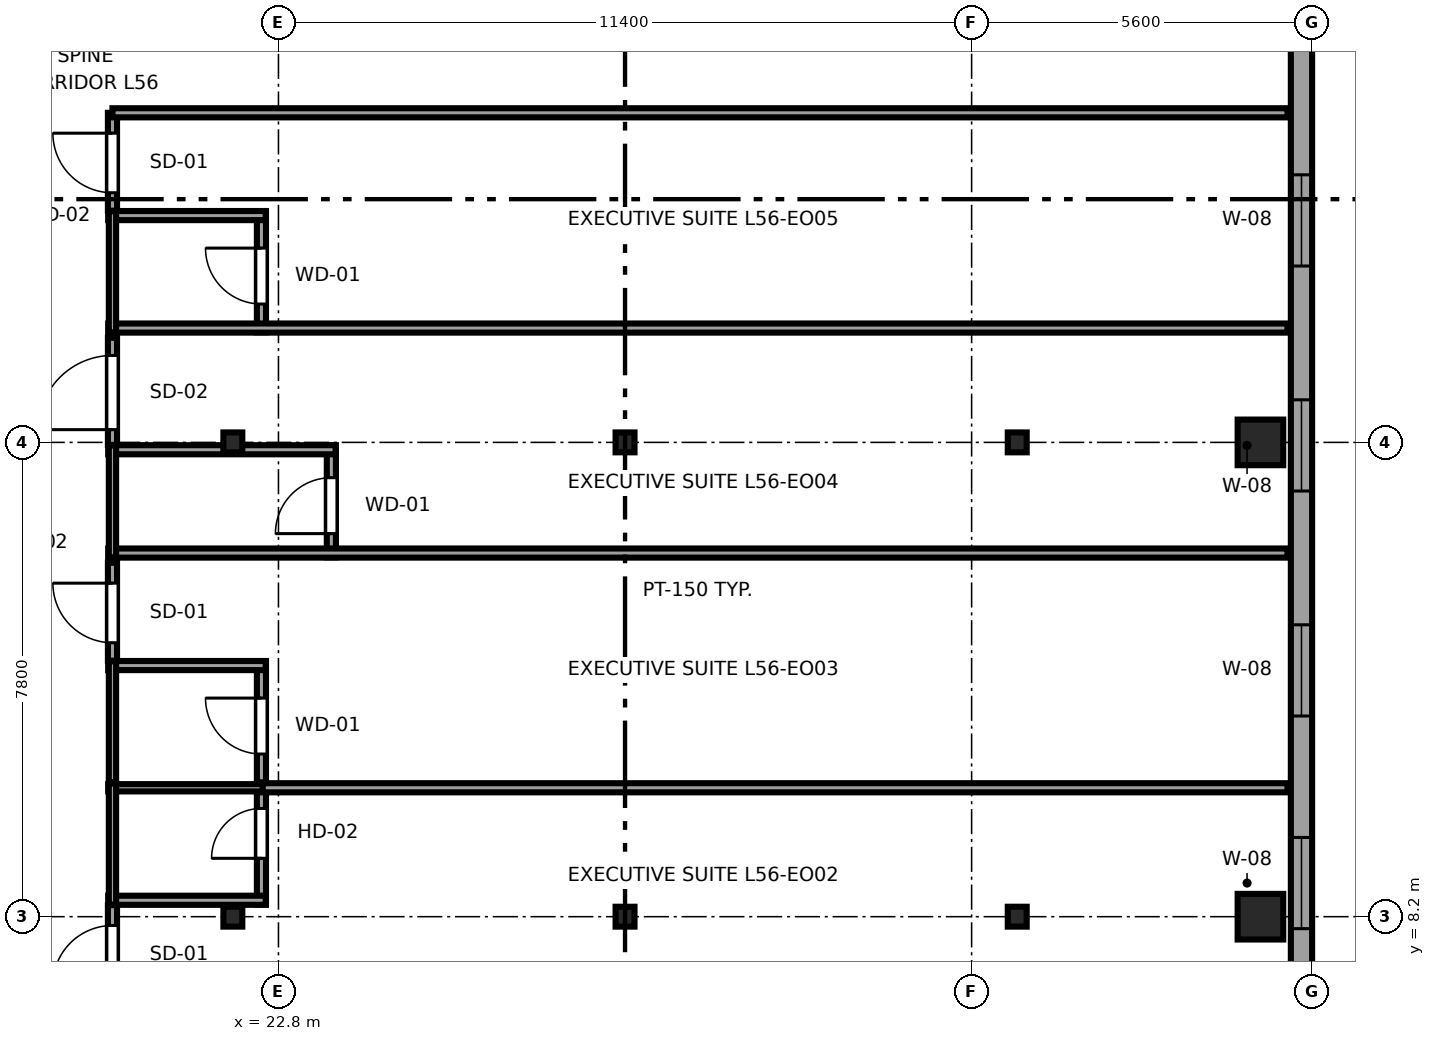
"""IFC4 building model, lengths in metres.
Left out: names, types, materials, properties, quantities, classifications, styles, units other than length and angle.
Written with IfcOpenShell. Run it as: python <this file> out.ifc"""

import sys

from ifc_helpers import new_model, si_unit, direction, frame, frame_2d, origin, origin_2d, place, context, subcontext, project, spatial, rectangle, i_section, extrude, source, transform, mapped, element, fill, save


model = new_model("IFC4")
c1 = context("Model", 3, precision=1e-05, world=origin(), true_north=direction((0.0, 1.0)))
c2 = subcontext(c1, "Body", "Model", "MODEL_VIEW")
j1 = project(units=[si_unit("LENGTHUNIT", "METRE"), si_unit("PLANEANGLEUNIT", "RADIAN")], contexts=[c1])
p1 = place(None, origin())
s1 = spatial("IfcSite", under=j1, at=p1, CompositionType="ELEMENT")
p2 = place(p1, origin())
s2 = spatial("IfcBuilding", under=s1, at=p2, CompositionType="ELEMENT")
p3 = place(p2, frame((0.0, 0.0, 213.25)))
s3 = spatial("IfcBuildingStorey", under=s2, at=p3, CompositionType="ELEMENT", Elevation=213.25)
m1 = source(origin(), c2, "Body", "SweptSolid", [
    extrude(i_section(OverallWidth=0.311, OverallDepth=0.327, WebThickness=0.016, FlangeThickness=0.025, FilletRadius=0.017, at=origin_2d()), origin(), (0.0, 0.0, 1.0), 3.55),
])
for number, where, z_axis, x_axis in (
    (1, (22.05, 8.2, 0.0), (0.0, 0.0, 1.0), (1.0, 0.0, 0.0)),
    (2, (22.05, 16.0, 0.0), (0.0, 0.0, 1.0), (1.0, 0.0, 0.0)),
    (3, (28.5, 8.2, 0.0), (0.0, 0.0, 1.0), (1.0, 0.0, 0.0)),
    (4, (28.5, 16.0, 0.0), (0.0, 0.0, 1.0), (1.0, 0.0, 0.0)),
    (5, (34.95, 8.2, 0.0), (0.0, 0.0, 1.0), (1.0, 0.0, 0.0)),
    (6, (34.95, 16.0, 0.0), (0.0, 0.0, 1.0), (1.0, 0.0, 0.0)),
):
    element("IfcColumn", number, at=place(p3, frame(where, z_axis=z_axis, x_axis=x_axis)), inside=s3, PredefinedType="COLUMN", context=c2, shape_type="MappedRepresentation", body=[
        mapped(m1, transform((0.0, 0.0, 0.0), x_axis=(1.0, 0.0, 0.0), y_axis=(0.0, 1.0, 0.0), z_axis=(0.0, 0.0, 1.0), scale=1.0)),
    ])
m2 = source(origin(), c2, "Body", "SweptSolid", [
    extrude(rectangle(XDim=0.75, YDim=0.75, at=origin_2d()), origin(), (0.0, 0.0, 1.0), 3.55),
])
for number, where, z_axis, x_axis in (
    (7, (38.95, 8.2, 0.0), (0.0, 0.0, 1.0), (1.0, 0.0, 0.0)),
    (8, (38.95, 16.0, 0.0), (0.0, 0.0, 1.0), (1.0, 0.0, 0.0)),
):
    element("IfcColumn", number, at=place(p3, frame(where, z_axis=z_axis, x_axis=x_axis)), inside=s3, PredefinedType="COLUMN", context=c2, shape_type="MappedRepresentation", body=[
        mapped(m2, transform((0.0, 0.0, 0.0), x_axis=(1.0, 0.0, 0.0), y_axis=(0.0, 1.0, 0.0), z_axis=(0.0, 0.0, 1.0), scale=1.0)),
    ])
p4 = place(p3, frame((39.625, 7.017, 0.0), z_axis=(0.0, 0.0, 1.0), x_axis=(0.0, 1.0, 0.0)))
e9 = element("IfcWall", 9, at=p4, inside=s3, PredefinedType="SOLIDWALL", context=c2, shape_type="SweptSolid", body=[
    extrude(rectangle(XDim=24.579, YDim=0.35, at=frame_2d((12.29, 0.0))), origin(), (0.0, 0.0, 1.0), 3.37),
])
p5 = place(p4, frame((20.291, 0.0, 0.68)))
e10 = element("IfcOpeningElement", 10, at=p5, cuts=e9, PredefinedType="OPENING", context=c2, shape_type="SweptSolid", body=[
    extrude(rectangle(XDim=2.7, YDim=1.95, at=frame_2d((1.35, 0.975))), frame((0.0, 0.185, 0.0), z_axis=(0.0, -1.0, 0.0), x_axis=(1.0, 0.0, 0.0)), (0.0, 0.0, 1.0), 0.37),
])
p6 = place(p4, frame((0.986, 0.0, 0.62)))
e11 = element("IfcOpeningElement", 11, at=p6, cuts=e9, PredefinedType="OPENING", context=c2, shape_type="SweptSolid", body=[
    extrude(rectangle(XDim=1.5, YDim=1.55, at=frame_2d((0.75, 0.775))), frame((0.0, 0.185, 0.0), z_axis=(0.0, -1.0, 0.0), x_axis=(1.0, 0.0, 0.0)), (0.0, 0.0, 1.0), 0.37),
])
p7 = place(p4, frame((4.483, 0.0, 0.62)))
e12 = element("IfcOpeningElement", 12, at=p7, cuts=e9, PredefinedType="OPENING", context=c2, shape_type="SweptSolid", body=[
    extrude(rectangle(XDim=1.5, YDim=1.55, at=frame_2d((0.75, 0.775))), frame((0.0, 0.185, 0.0), z_axis=(0.0, -1.0, 0.0), x_axis=(1.0, 0.0, 0.0)), (0.0, 0.0, 1.0), 0.37),
])
p8 = place(p4, frame((8.183, 0.0, 0.62)))
e13 = element("IfcOpeningElement", 13, at=p8, cuts=e9, PredefinedType="OPENING", context=c2, shape_type="SweptSolid", body=[
    extrude(rectangle(XDim=1.5, YDim=1.55, at=frame_2d((0.75, 0.775))), frame((0.0, 0.185, 0.0), z_axis=(0.0, -1.0, 0.0), x_axis=(1.0, 0.0, 0.0)), (0.0, 0.0, 1.0), 0.37),
])
p9 = place(p4, frame((11.883, 0.0, 0.62)))
e14 = element("IfcOpeningElement", 14, at=p9, cuts=e9, PredefinedType="OPENING", context=c2, shape_type="SweptSolid", body=[
    extrude(rectangle(XDim=1.5, YDim=1.55, at=frame_2d((0.75, 0.775))), frame((0.0, 0.185, 0.0), z_axis=(0.0, -1.0, 0.0), x_axis=(1.0, 0.0, 0.0)), (0.0, 0.0, 1.0), 0.37),
])
p10 = place(p3, frame((22.52, 8.4, 0.0), z_axis=(0.0, 0.0, 1.0), x_axis=(0.0, 1.0, 0.0)))
e15 = element("IfcWall", 15, at=p10, inside=s3, PredefinedType="PARTITIONING", context=c2, shape_type="SweptSolid", body=[
    extrude(rectangle(XDim=1.99, YDim=0.15, at=frame_2d((0.995, 0.0))), origin(), (0.0, 0.0, 1.0), 3.37),
])
p11 = place(p10, frame((0.76, 0.0, 0.0)))
e16 = element("IfcOpeningElement", 16, at=p11, cuts=e15, PredefinedType="OPENING", context=c2, shape_type="SweptSolid", body=[
    extrude(rectangle(XDim=0.82, YDim=2.01, at=frame_2d((0.41, 1.005))), frame((0.0, 0.085, 0.0), z_axis=(0.0, -1.0, 0.0), x_axis=(1.0, 0.0, 0.0)), (0.0, 0.0, 1.0), 0.17),
])
p12 = place(p3, frame((20.0, 8.47, 0.0), z_axis=(0.0, 0.0, 1.0), x_axis=(1.0, 0.0, 0.0)))
e17 = element("IfcWall", 17, at=p12, inside=s3, PredefinedType="PARTITIONING", context=c2, shape_type="SweptSolid", body=[
    extrude(rectangle(XDim=2.59, YDim=0.15, at=frame_2d((1.295, 0.0))), origin(), (0.0, 0.0, 1.0), 3.37),
])
p13 = place(p3, frame((20.0, 10.32, 0.0), z_axis=(0.0, 0.0, 1.0), x_axis=(1.0, 0.0, 0.0)))
e18 = element("IfcWall", 18, at=p13, inside=s3, PredefinedType="PLUMBINGWALL", context=c2, shape_type="SweptSolid", body=[
    extrude(rectangle(XDim=2.59, YDim=0.12, at=frame_2d((1.295, 0.0))), origin(), (0.0, 0.0, 1.0), 3.37),
])
p14 = place(p3, frame((20.07, 8.4, 0.0), z_axis=(0.0, 0.0, 1.0), x_axis=(0.0, 1.0, 0.0)))
e19 = element("IfcWall", 19, at=p14, inside=s3, PredefinedType="PLUMBINGWALL", context=c2, shape_type="SweptSolid", body=[
    extrude(rectangle(XDim=1.99, YDim=0.12, at=frame_2d((0.995, 0.0))), origin(), (0.0, 0.0, 1.0), 3.37),
])
p15 = place(p3, frame((22.52, 10.41, 0.0), z_axis=(0.0, 0.0, 1.0), x_axis=(0.0, 1.0, 0.0)))
e20 = element("IfcWall", 20, at=p15, inside=s3, PredefinedType="PARTITIONING", context=c2, shape_type="SweptSolid", body=[
    extrude(rectangle(XDim=1.99, YDim=0.15, at=frame_2d((0.995, 0.0))), origin(), (0.0, 0.0, 1.0), 3.37),
])
p16 = place(p15, frame((0.465, 0.0, 0.0)))
e21 = element("IfcOpeningElement", 21, at=p16, cuts=e20, PredefinedType="OPENING", context=c2, shape_type="SweptSolid", body=[
    extrude(rectangle(XDim=0.92, YDim=2.01, at=frame_2d((0.46, 1.005))), frame((0.0, 0.085, 0.0), z_axis=(0.0, -1.0, 0.0), x_axis=(1.0, 0.0, 0.0)), (0.0, 0.0, 1.0), 0.17),
])
p17 = place(p3, frame((20.0, 12.33, 0.0), z_axis=(0.0, 0.0, 1.0), x_axis=(1.0, 0.0, 0.0)))
e22 = element("IfcWall", 22, at=p17, inside=s3, PredefinedType="PARTITIONING", context=c2, shape_type="SweptSolid", body=[
    extrude(rectangle(XDim=2.59, YDim=0.15, at=frame_2d((1.295, 0.0))), origin(), (0.0, 0.0, 1.0), 3.37),
])
p18 = place(p3, frame((20.07, 10.41, 0.0), z_axis=(0.0, 0.0, 1.0), x_axis=(0.0, 1.0, 0.0)))
e23 = element("IfcWall", 23, at=p18, inside=s3, PredefinedType="PLUMBINGWALL", context=c2, shape_type="SweptSolid", body=[
    extrude(rectangle(XDim=1.99, YDim=0.12, at=frame_2d((0.995, 0.0))), origin(), (0.0, 0.0, 1.0), 3.37),
])
p19 = place(p3, frame((23.67, 14.11, 0.0), z_axis=(0.0, 0.0, 1.0), x_axis=(0.0, 1.0, 0.0)))
e24 = element("IfcWall", 24, at=p19, inside=s3, PredefinedType="PARTITIONING", context=c2, shape_type="SweptSolid", body=[
    extrude(rectangle(XDim=1.839, YDim=0.15, at=frame_2d((0.919, 0.0))), origin(), (0.0, 0.0, 1.0), 3.37),
])
p20 = place(p19, frame((0.389, 0.0, 0.0)))
e25 = element("IfcOpeningElement", 25, at=p20, cuts=e24, PredefinedType="OPENING", context=c2, shape_type="SweptSolid", body=[
    extrude(rectangle(XDim=0.92, YDim=2.01, at=frame_2d((0.46, 1.005))), frame((0.0, 0.085, 0.0), z_axis=(0.0, -1.0, 0.0), x_axis=(1.0, 0.0, 0.0)), (0.0, 0.0, 1.0), 0.17),
])
p21 = place(p3, frame((20.0, 14.18, 0.0), z_axis=(0.0, 0.0, 1.0), x_axis=(1.0, 0.0, 0.0)))
e26 = element("IfcWall", 26, at=p21, inside=s3, PredefinedType="PARTITIONING", context=c2, shape_type="SweptSolid", body=[
    extrude(rectangle(XDim=19.395, YDim=0.15, at=frame_2d((9.698, 0.0))), origin(), (0.0, 0.0, 1.0), 3.37),
])
p22 = place(p3, frame((20.0, 15.879, 0.0), z_axis=(0.0, 0.0, 1.0), x_axis=(1.0, 0.0, 0.0)))
e27 = element("IfcWall", 27, at=p22, inside=s3, PredefinedType="PARTITIONING", context=c2, shape_type="SweptSolid", body=[
    extrude(rectangle(XDim=3.74, YDim=0.15, at=frame_2d((1.87, 0.0))), origin(), (0.0, 0.0, 1.0), 2.758),
])
p23 = place(p3, frame((20.07, 14.11, 0.0), z_axis=(0.0, 0.0, 1.0), x_axis=(0.0, 1.0, 0.0)))
e28 = element("IfcWall", 28, at=p23, inside=s3, PredefinedType="PLUMBINGWALL", context=c2, shape_type="SweptSolid", body=[
    extrude(rectangle(XDim=1.839, YDim=0.12, at=frame_2d((0.919, 0.0))), origin(), (0.0, 0.0, 1.0), 3.37),
])
p24 = place(p3, frame((22.52, 17.81, 0.0), z_axis=(0.0, 0.0, 1.0), x_axis=(0.0, 1.0, 0.0)))
e29 = element("IfcWall", 29, at=p24, inside=s3, PredefinedType="PARTITIONING", context=c2, shape_type="SweptSolid", body=[
    extrude(rectangle(XDim=1.99, YDim=0.15, at=frame_2d((0.995, 0.0))), origin(), (0.0, 0.0, 1.0), 3.37),
])
p25 = place(p24, frame((0.465, 0.0, 0.0)))
e30 = element("IfcOpeningElement", 30, at=p25, cuts=e29, PredefinedType="OPENING", context=c2, shape_type="SweptSolid", body=[
    extrude(rectangle(XDim=0.92, YDim=2.01, at=frame_2d((0.46, 1.005))), frame((0.0, 0.085, 0.0), z_axis=(0.0, -1.0, 0.0), x_axis=(1.0, 0.0, 0.0)), (0.0, 0.0, 1.0), 0.17),
])
p26 = place(p3, frame((20.0, 17.88, 0.0), z_axis=(0.0, 0.0, 1.0), x_axis=(1.0, 0.0, 0.0)))
e31 = element("IfcWall", 31, at=p26, inside=s3, PredefinedType="PARTITIONING", context=c2, shape_type="SweptSolid", body=[
    extrude(rectangle(XDim=19.395, YDim=0.15, at=frame_2d((9.698, 0.0))), origin(), (0.0, 0.0, 1.0), 3.37),
])
p27 = place(p3, frame((20.0, 19.73, 0.0), z_axis=(0.0, 0.0, 1.0), x_axis=(1.0, 0.0, 0.0)))
e32 = element("IfcWall", 32, at=p27, inside=s3, PredefinedType="PARTITIONING", context=c2, shape_type="SweptSolid", body=[
    extrude(rectangle(XDim=2.59, YDim=0.15, at=frame_2d((1.295, 0.0))), origin(), (0.0, 0.0, 1.0), 3.37),
])
p28 = place(p3, frame((20.07, 17.81, 0.0), z_axis=(0.0, 0.0, 1.0), x_axis=(0.0, 1.0, 0.0)))
e33 = element("IfcWall", 33, at=p28, inside=s3, PredefinedType="PLUMBINGWALL", context=c2, shape_type="SweptSolid", body=[
    extrude(rectangle(XDim=1.99, YDim=0.12, at=frame_2d((0.995, 0.0))), origin(), (0.0, 0.0, 1.0), 3.37),
])
p29 = place(p3, frame((20.07, 6.78, 0.0), z_axis=(0.0, 0.0, 1.0), x_axis=(0.0, 1.0, 0.0)))
e34 = element("IfcWall", 34, at=p29, inside=s3, PredefinedType="PARTITIONING", context=c2, shape_type="SweptSolid", body=[
    extrude(rectangle(XDim=1.61, YDim=0.15, at=frame_2d((0.805, 0.0))), origin(), (0.0, 0.0, 1.0), 3.37),
])
p30 = place(p29, frame((0.295, 0.0, 0.0)))
e35 = element("IfcOpeningElement", 35, at=p30, cuts=e34, PredefinedType="OPENING", context=c2, shape_type="SweptSolid", body=[
    extrude(rectangle(XDim=0.98, YDim=2.12, at=frame_2d((0.49, 1.06))), frame((0.0, 0.085, 0.0), z_axis=(0.0, -1.0, 0.0), x_axis=(1.0, 0.0, 0.0)), (0.0, 0.0, 1.0), 0.17),
])
p31 = place(p3, frame((22.54, 10.32, 0.0), z_axis=(0.0, 0.0, 1.0), x_axis=(1.0, 0.0, 0.0)))
e36 = element("IfcWall", 36, at=p31, inside=s3, PredefinedType="PARTITIONING", context=c2, shape_type="SweptSolid", body=[
    extrude(rectangle(XDim=16.855, YDim=0.15, at=frame_2d((8.427, 0.0))), origin(), (0.0, 0.0, 1.0), 3.37),
])
p32 = place(p3, frame((20.07, 12.41, 0.0), z_axis=(0.0, 0.0, 1.0), x_axis=(0.0, 1.0, 0.0)))
e37 = element("IfcWall", 37, at=p32, inside=s3, PredefinedType="PARTITIONING", context=c2, shape_type="SweptSolid", body=[
    extrude(rectangle(XDim=1.61, YDim=0.15, at=frame_2d((0.805, 0.0))), origin(), (0.0, 0.0, 1.0), 3.37),
])
p33 = place(p32, frame((0.295, 0.0, 0.0)))
e38 = element("IfcOpeningElement", 38, at=p33, cuts=e37, PredefinedType="OPENING", context=c2, shape_type="SweptSolid", body=[
    extrude(rectangle(XDim=0.98, YDim=2.12, at=frame_2d((0.49, 1.06))), frame((0.0, 0.085, 0.0), z_axis=(0.0, -1.0, 0.0), x_axis=(1.0, 0.0, 0.0)), (0.0, 0.0, 1.0), 0.17),
])
p34 = place(p3, frame((20.07, 15.959, 0.0), z_axis=(0.0, 0.0, 1.0), x_axis=(0.0, 1.0, 0.0)))
e39 = element("IfcWall", 39, at=p34, inside=s3, PredefinedType="PARTITIONING", context=c2, shape_type="SweptSolid", body=[
    extrude(rectangle(XDim=1.761, YDim=0.15, at=frame_2d((0.88, 0.0))), origin(), (0.0, 0.0, 1.0), 3.37),
])
p35 = place(p34, frame((0.25, 0.0, 0.0)))
e40 = element("IfcOpeningElement", 40, at=p35, cuts=e39, PredefinedType="OPENING", context=c2, shape_type="SweptSolid", body=[
    extrude(rectangle(XDim=1.22, YDim=2.08, at=frame_2d((0.61, 1.04))), frame((0.0, 0.085, 0.0), z_axis=(0.0, -1.0, 0.0), x_axis=(1.0, 0.0, 0.0)), (0.0, 0.0, 1.0), 0.17),
])
p36 = place(p3, frame((20.07, 19.81, 0.0), z_axis=(0.0, 0.0, 1.0), x_axis=(0.0, 1.0, 0.0)))
e41 = element("IfcWall", 41, at=p36, inside=s3, PredefinedType="PARTITIONING", context=c2, shape_type="SweptSolid", body=[
    extrude(rectangle(XDim=1.61, YDim=0.15, at=frame_2d((0.805, 0.0))), origin(), (0.0, 0.0, 1.0), 3.37),
])
p37 = place(p36, frame((0.295, 0.0, 0.0)))
e42 = element("IfcOpeningElement", 42, at=p37, cuts=e41, PredefinedType="OPENING", context=c2, shape_type="SweptSolid", body=[
    extrude(rectangle(XDim=0.98, YDim=2.12, at=frame_2d((0.49, 1.06))), frame((0.0, 0.085, 0.0), z_axis=(0.0, -1.0, 0.0), x_axis=(1.0, 0.0, 0.0)), (0.0, 0.0, 1.0), 0.17),
])
p38 = place(p3, frame((20.07, 21.42, 0.0), z_axis=(0.0, 0.0, 1.0), x_axis=(1.0, 0.0, 0.0)))
e43 = element("IfcWall", 43, at=p38, inside=s3, PredefinedType="PARTITIONING", context=c2, shape_type="SweptSolid", body=[
    extrude(rectangle(XDim=19.325, YDim=0.15, at=frame_2d((9.663, 0.0))), origin(), (0.0, 0.0, 1.0), 3.37),
])
m3 = source(origin(), c2, "Body", "SweptSolid", [
    extrude(rectangle(XDim=1.5, YDim=1.55, at=frame_2d((0.75, 0.775))), frame((0.0, 0.09, 0.0), z_axis=(0.0, -1.0, 0.0), x_axis=(1.0, 0.0, 0.0)), (0.0, 0.0, 1.0), 0.06),
])
p39 = place(p6, origin())
e44 = element("IfcWindow", 44, at=p39, inside=s3, PartitioningType="SINGLE_PANEL", PredefinedType="WINDOW", context=c2, shape_type="MappedRepresentation", body=[
    mapped(m3, transform((0.0, 0.0, 0.0), x_axis=(1.0, 0.0, 0.0), y_axis=(0.0, 1.0, 0.0), z_axis=(0.0, 0.0, 1.0), scale=1.0)),
])
fill(e11, e44)
p40 = place(p7, origin())
e45 = element("IfcWindow", 45, at=p40, inside=s3, PartitioningType="SINGLE_PANEL", PredefinedType="WINDOW", context=c2, shape_type="MappedRepresentation", body=[
    mapped(m3, transform((0.0, 0.0, 0.0), x_axis=(1.0, 0.0, 0.0), y_axis=(0.0, 1.0, 0.0), z_axis=(0.0, 0.0, 1.0), scale=1.0)),
])
fill(e12, e45)
p41 = place(p8, origin())
e46 = element("IfcWindow", 46, at=p41, inside=s3, PartitioningType="SINGLE_PANEL", PredefinedType="WINDOW", context=c2, shape_type="MappedRepresentation", body=[
    mapped(m3, transform((0.0, 0.0, 0.0), x_axis=(1.0, 0.0, 0.0), y_axis=(0.0, 1.0, 0.0), z_axis=(0.0, 0.0, 1.0), scale=1.0)),
])
fill(e13, e46)
p42 = place(p9, origin())
e47 = element("IfcWindow", 47, at=p42, inside=s3, PartitioningType="SINGLE_PANEL", PredefinedType="WINDOW", context=c2, shape_type="MappedRepresentation", body=[
    mapped(m3, transform((0.0, 0.0, 0.0), x_axis=(1.0, 0.0, 0.0), y_axis=(0.0, 1.0, 0.0), z_axis=(0.0, 0.0, 1.0), scale=1.0)),
])
fill(e14, e47)
m4 = source(origin(), c2, "Body", "SweptSolid", [
    extrude(rectangle(XDim=0.82, YDim=2.01, at=frame_2d((0.41, 1.005))), frame((0.0, 0.025, 0.0), z_axis=(0.0, -1.0, 0.0), x_axis=(1.0, 0.0, 0.0)), (0.0, 0.0, 1.0), 0.05),
])
p43 = place(p11, origin())
e48 = element("IfcDoor", 48, at=p43, inside=s3, OperationType="SINGLE_SWING_LEFT", PredefinedType="DOOR", context=c2, shape_type="MappedRepresentation", body=[
    mapped(m4, transform((0.0, 0.0, 0.0), x_axis=(1.0, 0.0, 0.0), y_axis=(0.0, 1.0, 0.0), z_axis=(0.0, 0.0, 1.0), scale=1.0)),
])
fill(e16, e48)
m5 = source(origin(), c2, "Body", "SweptSolid", [
    extrude(rectangle(XDim=0.92, YDim=2.01, at=frame_2d((0.46, 1.005))), frame((0.0, 0.025, 0.0), z_axis=(0.0, -1.0, 0.0), x_axis=(1.0, 0.0, 0.0)), (0.0, 0.0, 1.0), 0.05),
])
p44 = place(p16, origin())
e49 = element("IfcDoor", 49, at=p44, inside=s3, OperationType="SINGLE_SWING_RIGHT", PredefinedType="DOOR", context=c2, shape_type="MappedRepresentation", body=[
    mapped(m5, transform((0.0, 0.0, 0.0), x_axis=(1.0, 0.0, 0.0), y_axis=(0.0, 1.0, 0.0), z_axis=(0.0, 0.0, 1.0), scale=1.0)),
])
fill(e21, e49)
p45 = place(p20, origin())
e50 = element("IfcDoor", 50, at=p45, inside=s3, OperationType="SINGLE_SWING_LEFT", PredefinedType="DOOR", context=c2, shape_type="MappedRepresentation", body=[
    mapped(m5, transform((0.0, 0.0, 0.0), x_axis=(1.0, 0.0, 0.0), y_axis=(0.0, 1.0, 0.0), z_axis=(0.0, 0.0, 1.0), scale=1.0)),
])
fill(e25, e50)
p46 = place(p25, origin())
e51 = element("IfcDoor", 51, at=p46, inside=s3, OperationType="SINGLE_SWING_RIGHT", PredefinedType="DOOR", context=c2, shape_type="MappedRepresentation", body=[
    mapped(m5, transform((0.0, 0.0, 0.0), x_axis=(1.0, 0.0, 0.0), y_axis=(0.0, 1.0, 0.0), z_axis=(0.0, 0.0, 1.0), scale=1.0)),
])
fill(e30, e51)
m6 = source(origin(), c2, "Body", "SweptSolid", [
    extrude(rectangle(XDim=0.98, YDim=2.12, at=frame_2d((0.49, 1.06))), frame((0.0, 0.025, 0.0), z_axis=(0.0, -1.0, 0.0), x_axis=(1.0, 0.0, 0.0)), (0.0, 0.0, 1.0), 0.05),
])
p47 = place(p30, origin())
e52 = element("IfcDoor", 52, at=p47, inside=s3, OperationType="SINGLE_SWING_LEFT", PredefinedType="DOOR", context=c2, shape_type="MappedRepresentation", body=[
    mapped(m6, transform((0.0, 0.0, 0.0), x_axis=(1.0, 0.0, 0.0), y_axis=(0.0, 1.0, 0.0), z_axis=(0.0, 0.0, 1.0), scale=1.0)),
])
fill(e35, e52)
p48 = place(p33, origin())
e53 = element("IfcDoor", 53, at=p48, inside=s3, OperationType="SINGLE_SWING_RIGHT", PredefinedType="DOOR", context=c2, shape_type="MappedRepresentation", body=[
    mapped(m6, transform((0.0, 0.0, 0.0), x_axis=(1.0, 0.0, 0.0), y_axis=(0.0, 1.0, 0.0), z_axis=(0.0, 0.0, 1.0), scale=1.0)),
])
fill(e38, e53)
m7 = source(origin(), c2, "Body", "SweptSolid", [
    extrude(rectangle(XDim=1.22, YDim=2.08, at=frame_2d((0.61, 1.04))), frame((0.0, 0.025, 0.0), z_axis=(0.0, -1.0, 0.0), x_axis=(1.0, 0.0, 0.0)), (0.0, 0.0, 1.0), 0.05),
])
p49 = place(p35, origin())
e54 = element("IfcDoor", 54, at=p49, inside=s3, OperationType="SINGLE_SWING_LEFT", PredefinedType="DOOR", context=c2, shape_type="MappedRepresentation", body=[
    mapped(m7, transform((0.0, 0.0, 0.0), x_axis=(1.0, 0.0, 0.0), y_axis=(0.0, 1.0, 0.0), z_axis=(0.0, 0.0, 1.0), scale=1.0)),
])
fill(e40, e54)
p50 = place(p37, origin())
e55 = element("IfcDoor", 55, at=p50, inside=s3, OperationType="SINGLE_SWING_RIGHT", PredefinedType="DOOR", context=c2, shape_type="MappedRepresentation", body=[
    mapped(m6, transform((0.0, 0.0, 0.0), x_axis=(1.0, 0.0, 0.0), y_axis=(0.0, 1.0, 0.0), z_axis=(0.0, 0.0, 1.0), scale=1.0)),
])
fill(e42, e55)
save(model, sys.argv[1])
